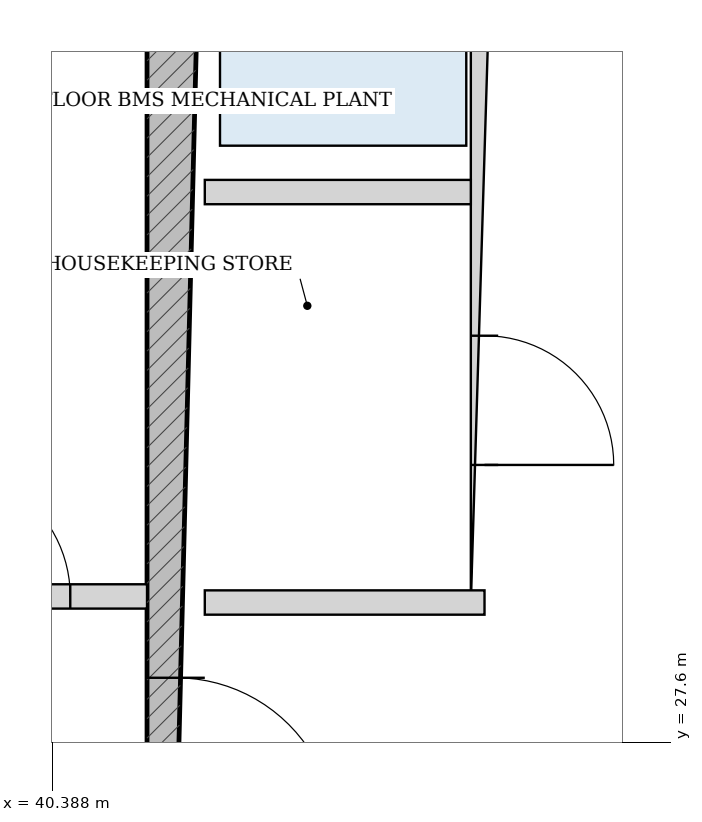
"""IFC4 building model, lengths in metres.
Left out: names, types, materials, properties, quantities, classifications, styles, units other than length and angle.
Written with IfcOpenShell. Run it as: python <this file> out.ifc"""

import sys

from ifc_helpers import new_model, si_unit, direction, frame, frame_2d, origin, place, context, subcontext, project, spatial, rectangle, extrude, source, transform, mapped, element, fill, save


model = new_model("IFC4")
c1 = context("Model", 3, precision=1e-05, world=origin(), true_north=direction((-0.2419218956, 0.970295726276)))
c2 = subcontext(c1, "Body", "Model", "MODEL_VIEW")
j1 = project(units=[si_unit("LENGTHUNIT", "METRE"), si_unit("PLANEANGLEUNIT", "RADIAN")], contexts=[c1])
p1 = place(None, origin())
s1 = spatial("IfcSite", under=j1, at=p1, CompositionType="ELEMENT")
p2 = place(p1, origin())
s2 = spatial("IfcBuilding", under=s1, at=p2, CompositionType="ELEMENT")
p3 = place(p2, frame((0.0, 0.0, 178.6)))
s3 = spatial("IfcBuildingStorey", under=s2, at=p3, CompositionType="ELEMENT", Elevation=178.6)
p4 = place(p3, frame((41.2, 19.175, 0.0), z_axis=(0.0, 0.0, 1.0), x_axis=(0.0, 1.0, 0.0)))
e1 = element("IfcWall", 1, at=p4, inside=s3, PredefinedType="SHEAR", context=c2, shape_type="SweptSolid", body=[
    extrude(rectangle(XDim=15.25, YDim=0.38, at=frame_2d((7.625, 0.0))), origin(), (0.0, 0.0, 1.0), 3.33),
])
p5 = place(p4, frame((7.8, 0.0, 0.0)))
e2 = element("IfcOpeningElement", 2, at=p5, cuts=e1, PredefinedType="OPENING", context=c2, shape_type="SweptSolid", body=[
    extrude(rectangle(XDim=1.05, YDim=2.15, at=frame_2d((0.525, 1.075))), frame((0.0, 0.2, 0.0), z_axis=(0.0, -1.0, 0.0), x_axis=(1.0, 0.0, 0.0)), (0.0, 0.0, 1.0), 0.4),
])
p6 = place(p3, frame((43.23, 28.52, 0.0), z_axis=(0.0, 0.0, 1.0), x_axis=(0.0, 1.0, 0.0)))
e3 = element("IfcWall", 3, at=p6, inside=s3, PredefinedType="PARTITIONING", context=c2, shape_type="SweptSolid", body=[
    extrude(rectangle(XDim=5.905, YDim=0.18, at=frame_2d((2.953, 0.0))), origin(), (0.0, 0.0, 1.0), 3.33),
])
p7 = place(p6, frame((0.905, 0.0, 0.0)))
e4 = element("IfcOpeningElement", 4, at=p7, cuts=e3, PredefinedType="OPENING", context=c2, shape_type="SweptSolid", body=[
    extrude(rectangle(XDim=0.85, YDim=2.1, at=frame_2d((0.425, 1.05))), frame((0.0, 0.1, 0.0), z_axis=(0.0, -1.0, 0.0), x_axis=(1.0, 0.0, 0.0)), (0.0, 0.0, 1.0), 0.2),
])
p8 = place(p6, frame((3.655, 0.0, 0.0)))
e5 = element("IfcOpeningElement", 5, at=p8, cuts=e3, PredefinedType="OPENING", context=c2, shape_type="SweptSolid", body=[
    extrude(rectangle(XDim=1.15, YDim=2.2, at=frame_2d((0.575, 1.1))), frame((0.0, 0.1, 0.0), z_axis=(0.0, -1.0, 0.0), x_axis=(1.0, 0.0, 0.0)), (0.0, 0.0, 1.0), 0.2),
])
p9 = place(p3, frame((41.39, 31.22, 0.0), z_axis=(0.0, 0.0, 1.0), x_axis=(1.0, 0.0, 0.0)))
e6 = element("IfcWall", 6, at=p9, inside=s3, PredefinedType="PARTITIONING", context=c2, shape_type="SweptSolid", body=[
    extrude(rectangle(XDim=1.75, YDim=0.16, at=frame_2d((0.875, 0.0))), origin(), (0.0, 0.0, 1.0), 3.33),
])
p10 = place(p3, frame((41.39, 28.52, 0.0), z_axis=(0.0, 0.0, 1.0), x_axis=(1.0, 0.0, 0.0)))
e7 = element("IfcWall", 7, at=p10, inside=s3, PredefinedType="PARTITIONING", context=c2, shape_type="SweptSolid", body=[
    extrude(rectangle(XDim=1.84, YDim=0.16, at=frame_2d((0.92, 0.0))), origin(), (0.0, 0.0, 1.0), 3.33),
])
p11 = place(p3, frame((34.99, 28.56, 0.0), z_axis=(0.0, 0.0, 1.0), x_axis=(1.0, 0.0, 0.0)))
e8 = element("IfcWall", 8, at=p11, inside=s3, PredefinedType="PARTITIONING", context=c2, shape_type="SweptSolid", body=[
    extrude(rectangle(XDim=6.02, YDim=0.16, at=frame_2d((3.01, 0.0))), origin(), (0.0, 0.0, 1.0), 3.33),
])
p12 = place(p11, frame((0.505, 0.0, 0.0)))
e9 = element("IfcOpeningElement", 9, at=p12, cuts=e8, PredefinedType="OPENING", context=c2, shape_type="SweptSolid", body=[
    extrude(rectangle(XDim=0.85, YDim=2.1, at=frame_2d((0.425, 1.05))), frame((0.0, 0.09, 0.0), z_axis=(0.0, -1.0, 0.0), x_axis=(1.0, 0.0, 0.0)), (0.0, 0.0, 1.0), 0.18),
])
p13 = place(p11, frame((2.58, 0.0, 0.0)))
e10 = element("IfcOpeningElement", 10, at=p13, cuts=e8, PredefinedType="OPENING", context=c2, shape_type="SweptSolid", body=[
    extrude(rectangle(XDim=0.86, YDim=2.1, at=frame_2d((0.43, 1.05))), frame((0.0, 0.09, 0.0), z_axis=(0.0, -1.0, 0.0), x_axis=(1.0, 0.0, 0.0)), (0.0, 0.0, 1.0), 0.18),
])
p14 = place(p11, frame((4.665, 0.0, 0.0)))
e11 = element("IfcOpeningElement", 11, at=p14, cuts=e8, PredefinedType="OPENING", context=c2, shape_type="SweptSolid", body=[
    extrude(rectangle(XDim=0.85, YDim=2.1, at=frame_2d((0.425, 1.05))), frame((0.0, 0.09, 0.0), z_axis=(0.0, -1.0, 0.0), x_axis=(1.0, 0.0, 0.0)), (0.0, 0.0, 1.0), 0.18),
])
m1 = source(origin(), c2, "Body", "SweptSolid", [
    extrude(rectangle(XDim=1.05, YDim=2.15, at=frame_2d((0.525, 1.075))), frame((0.0, 0.025, 0.0), z_axis=(0.0, -1.0, 0.0), x_axis=(1.0, 0.0, 0.0)), (0.0, 0.0, 1.0), 0.05),
])
p15 = place(p5, frame((1.05, 0.0, 0.0), z_axis=(0.0, 0.0, 1.0), x_axis=(-1.0, 0.0, 0.0)))
e12 = element("IfcDoor", 12, at=p15, inside=s3, OperationType="SINGLE_SWING_RIGHT", PredefinedType="DOOR", context=c2, shape_type="MappedRepresentation", body=[
    mapped(m1, transform((0.0, 0.0, 0.0), scale=1.0)),
])
fill(e2, e12)
m2 = source(origin(), c2, "Body", "SweptSolid", [
    extrude(rectangle(XDim=0.85, YDim=2.1, at=frame_2d((0.425, 1.05))), frame((0.0, 0.025, 0.0), z_axis=(0.0, -1.0, 0.0), x_axis=(1.0, 0.0, 0.0)), (0.0, 0.0, 1.0), 0.05),
])
p16 = place(p7, frame((0.85, 0.0, 0.0), z_axis=(0.0, 0.0, 1.0), x_axis=(-1.0, 0.0, 0.0)))
e13 = element("IfcDoor", 13, at=p16, inside=s3, OperationType="SINGLE_SWING_RIGHT", PredefinedType="DOOR", context=c2, shape_type="MappedRepresentation", body=[
    mapped(m2, transform((0.0, 0.0, 0.0), scale=1.0)),
])
fill(e4, e13)
p17 = place(p14, origin())
e14 = element("IfcDoor", 14, at=p17, inside=s3, OperationType="SINGLE_SWING_LEFT", PredefinedType="DOOR", context=c2, shape_type="MappedRepresentation", body=[
    mapped(m2, transform((0.0, 0.0, 0.0), scale=1.0)),
])
fill(e11, e14)
save(model, sys.argv[1])
